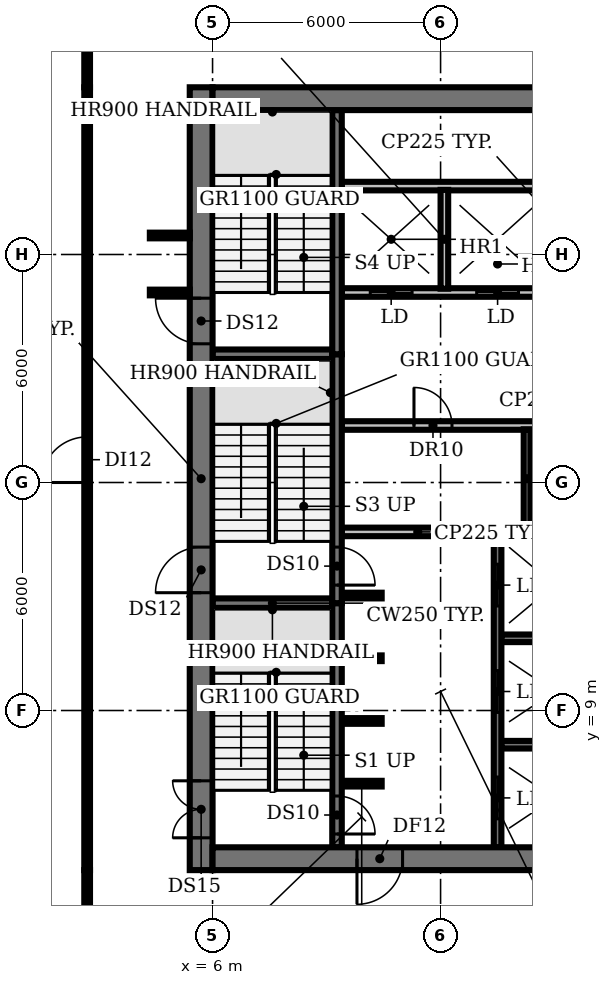
"""IFC4 building model, lengths in metres.
Left out: names, types, materials, properties, quantities, classifications, styles, units other than length and angle.
Written with IfcOpenShell. Run it as: python <this file> out.ifc"""

import sys

from ifc_helpers import new_model, si_unit, direction, frame, frame_2d, origin, place, context, subcontext, project, spatial, rectangle, extrude, element, fill, save


model = new_model("IFC4")
c1 = context("Model", 3, precision=1e-05, world=origin(), true_north=direction((0.0, 1.0)))
c2 = subcontext(c1, "Body", "Model", "MODEL_VIEW")
j1 = project(units=[si_unit("LENGTHUNIT", "METRE"), si_unit("PLANEANGLEUNIT", "RADIAN")], contexts=[c1])
p1 = place(None, origin())
s1 = spatial("IfcSite", under=j1, at=p1, CompositionType="ELEMENT")
p2 = place(p1, origin())
s2 = spatial("IfcBuilding", under=s1, at=p2, CompositionType="ELEMENT")
p3 = place(p2, frame((0.0, 0.0, 180.2)))
s3 = spatial("IfcBuildingStorey", under=s2, at=p3, CompositionType="ELEMENT", Elevation=180.2)
p4 = place(p3, frame((9.4, 7.075, 0.0), z_axis=(0.0, 0.0, 1.0), x_axis=(1.0, 0.0, 0.0)))
e1 = element("IfcWall", 1, at=p4, inside=s3, PredefinedType="SHEAR", context=c2, shape_type="SweptSolid", body=[
    extrude(rectangle(XDim=1.05, YDim=0.15, at=frame_2d((0.525, 0.0))), origin(), (0.0, 0.0, 1.0), 3.85),
])
p5 = place(p3, frame((13.6, 8.1, 0.0), z_axis=(0.0, 0.0, 1.0), x_axis=(1.0, 0.0, 0.0)))
e2 = element("IfcWall", 2, at=p5, inside=s3, PredefinedType="SHEAR", context=c2, shape_type="SweptSolid", body=[
    extrude(rectangle(XDim=2.8, YDim=0.2, at=frame_2d((1.4, 0.0))), origin(), (0.0, 0.0, 1.0), 3.85),
])
for number, where, z_axis, x_axis in (
    (3, (9.4, 8.725, 0.0), (0.0, 0.0, 1.0), (1.0, 0.0, 0.0)),
    (4, (9.4, 10.375, 0.0), (0.0, 0.0, 1.0), (1.0, 0.0, 0.0)),
):
    element("IfcWall", number, at=place(p3, frame(where, z_axis=z_axis, x_axis=x_axis)), inside=s3, PredefinedType="SHEAR", context=c2, shape_type="SweptSolid", body=[
        extrude(rectangle(XDim=1.05, YDim=0.15, at=frame_2d((0.525, 0.0))), origin(), (0.0, 0.0, 1.0), 3.85),
    ])
p6 = place(p3, frame((13.6, 10.9, 0.0), z_axis=(0.0, 0.0, 1.0), x_axis=(1.0, 0.0, 0.0)))
e5 = element("IfcWall", 5, at=p6, inside=s3, PredefinedType="SHEAR", context=c2, shape_type="SweptSolid", body=[
    extrude(rectangle(XDim=2.8, YDim=0.2, at=frame_2d((1.4, 0.0))), origin(), (0.0, 0.0, 1.0), 3.85),
])
p7 = place(p3, frame((6.0, 11.825, 0.0), z_axis=(0.0, 0.0, 1.0), x_axis=(1.0, 0.0, 0.0)))
e6 = element("IfcWall", 6, at=p7, inside=s3, PredefinedType="SHEAR", context=c2, shape_type="SweptSolid", body=[
    extrude(rectangle(XDim=3.15, YDim=0.25, at=frame_2d((1.575, 0.0))), origin(), (0.0, 0.0, 1.0), 3.85),
])
p8 = place(p3, frame((9.4, 12.025, 0.0), z_axis=(0.0, 0.0, 1.0), x_axis=(1.0, 0.0, 0.0)))
e7 = element("IfcWall", 7, at=p8, inside=s3, PredefinedType="SHEAR", context=c2, shape_type="SweptSolid", body=[
    extrude(rectangle(XDim=1.05, YDim=0.15, at=frame_2d((0.525, 0.0))), origin(), (0.0, 0.0, 1.0), 3.85),
])
p9 = place(p3, frame((9.4, 13.7, 0.0), z_axis=(0.0, 0.0, 1.0), x_axis=(1.0, 0.0, 0.0)))
e8 = element("IfcWall", 8, at=p9, inside=s3, PredefinedType="PARTITIONING", context=c2, shape_type="SweptSolid", body=[
    extrude(rectangle(XDim=4.0, YDim=0.225, at=frame_2d((2.0, 0.0))), origin(), (0.0, 0.0, 1.0), 3.85),
])
p10 = place(p3, frame((13.6, 13.7, 0.0), z_axis=(0.0, 0.0, 1.0), x_axis=(1.0, 0.0, 0.0)))
e9 = element("IfcWall", 9, at=p10, inside=s3, PredefinedType="SHEAR", context=c2, shape_type="SweptSolid", body=[
    extrude(rectangle(XDim=2.8, YDim=0.2, at=frame_2d((1.4, 0.0))), origin(), (0.0, 0.0, 1.0), 3.85),
])
p11 = place(p3, frame((9.4, 16.5, 0.0), z_axis=(0.0, 0.0, 1.0), x_axis=(1.0, 0.0, 0.0)))
e10 = element("IfcWall", 10, at=p11, inside=s3, PredefinedType="PARTITIONING", context=c2, shape_type="SweptSolid", body=[
    extrude(rectangle(XDim=14.6, YDim=0.225, at=frame_2d((7.3, 0.0))), origin(), (0.0, 0.0, 1.0), 3.85),
])
p12 = place(p11, frame((1.9, 0.0, 0.0)))
e11 = element("IfcOpeningElement", 11, at=p12, cuts=e10, PredefinedType="OPENING", context=c2, shape_type="SweptSolid", body=[
    extrude(rectangle(XDim=1.0, YDim=2.1, at=frame_2d((0.5, 1.05))), frame((0.0, 0.123, 0.0), z_axis=(0.0, -1.0, 0.0), x_axis=(1.0, 0.0, 0.0)), (0.0, 0.0, 1.0), 0.245),
])
p13 = place(p11, frame((7.475, 0.0, 0.0)))
e12 = element("IfcOpeningElement", 12, at=p13, cuts=e10, PredefinedType="OPENING", context=c2, shape_type="SweptSolid", body=[
    extrude(rectangle(XDim=1.0, YDim=2.1, at=frame_2d((0.5, 1.05))), frame((0.0, 0.123, 0.0), z_axis=(0.0, -1.0, 0.0), x_axis=(1.0, 0.0, 0.0)), (0.0, 0.0, 1.0), 0.245),
])
p14 = place(p11, frame((11.308, 0.0, 0.0)))
e13 = element("IfcOpeningElement", 13, at=p14, cuts=e10, PredefinedType="OPENING", context=c2, shape_type="SweptSolid", body=[
    extrude(rectangle(XDim=0.9, YDim=2.1, at=frame_2d((0.45, 1.05))), frame((0.0, 0.123, 0.0), z_axis=(0.0, -1.0, 0.0), x_axis=(1.0, 0.0, 0.0)), (0.0, 0.0, 1.0), 0.245),
])
p15 = place(p11, frame((13.083, 0.0, 0.0)))
e14 = element("IfcOpeningElement", 14, at=p15, cuts=e10, PredefinedType="OPENING", context=c2, shape_type="SweptSolid", body=[
    extrude(rectangle(XDim=0.9, YDim=2.1, at=frame_2d((0.45, 1.05))), frame((0.0, 0.123, 0.0), z_axis=(0.0, -1.0, 0.0), x_axis=(1.0, 0.0, 0.0)), (0.0, 0.0, 1.0), 0.245),
])
p16 = place(p3, frame((6.0, 18.375, 0.0), z_axis=(0.0, 0.0, 1.0), x_axis=(1.0, 0.0, 0.0)))
e15 = element("IfcWall", 15, at=p16, inside=s3, PredefinedType="SHEAR", context=c2, shape_type="SweptSolid", body=[
    extrude(rectangle(XDim=3.15, YDim=0.25, at=frame_2d((1.575, 0.0))), origin(), (0.0, 0.0, 1.0), 3.85),
])
p17 = place(p3, frame((24.0, 20.0, 0.0), z_axis=(0.0, 0.0, 1.0), x_axis=(-1.0, 0.0, 0.0)))
e16 = element("IfcWall", 16, at=p17, inside=s3, PredefinedType="PARTITIONING", context=c2, shape_type="SweptSolid", body=[
    extrude(rectangle(XDim=14.6, YDim=0.225, at=frame_2d((7.3, 0.0))), origin(), (0.0, 0.0, 1.0), 3.85),
])
p18 = place(p17, frame((12.75, 0.0, 0.0)))
e17 = element("IfcOpeningElement", 17, at=p18, cuts=e16, PredefinedType="OPENING", context=c2, shape_type="SweptSolid", body=[
    extrude(rectangle(XDim=1.1, YDim=2.1, at=frame_2d((0.55, 1.05))), frame((0.0, 0.123, 0.0), z_axis=(0.0, -1.0, 0.0), x_axis=(1.0, 0.0, 0.0)), (0.0, 0.0, 1.0), 0.245),
])
p19 = place(p17, frame((9.95, 0.0, 0.0)))
e18 = element("IfcOpeningElement", 18, at=p19, cuts=e16, PredefinedType="OPENING", context=c2, shape_type="SweptSolid", body=[
    extrude(rectangle(XDim=1.1, YDim=2.1, at=frame_2d((0.55, 1.05))), frame((0.0, 0.123, 0.0), z_axis=(0.0, -1.0, 0.0), x_axis=(1.0, 0.0, 0.0)), (0.0, 0.0, 1.0), 0.245),
])
p20 = place(p17, frame((7.15, 0.0, 0.0)))
e19 = element("IfcOpeningElement", 19, at=p20, cuts=e16, PredefinedType="OPENING", context=c2, shape_type="SweptSolid", body=[
    extrude(rectangle(XDim=1.1, YDim=2.1, at=frame_2d((0.55, 1.05))), frame((0.0, 0.123, 0.0), z_axis=(0.0, -1.0, 0.0), x_axis=(1.0, 0.0, 0.0)), (0.0, 0.0, 1.0), 0.245),
])
p21 = place(p17, frame((4.35, 0.0, 0.0)))
e20 = element("IfcOpeningElement", 20, at=p21, cuts=e16, PredefinedType="OPENING", context=c2, shape_type="SweptSolid", body=[
    extrude(rectangle(XDim=1.1, YDim=2.1, at=frame_2d((0.55, 1.05))), frame((0.0, 0.123, 0.0), z_axis=(0.0, -1.0, 0.0), x_axis=(1.0, 0.0, 0.0)), (0.0, 0.0, 1.0), 0.245),
])
p22 = place(p17, frame((2.308, 0.0, 0.0)))
e21 = element("IfcOpeningElement", 21, at=p22, cuts=e16, PredefinedType="OPENING", context=c2, shape_type="SweptSolid", body=[
    extrude(rectangle(XDim=0.9, YDim=2.1, at=frame_2d((0.45, 1.05))), frame((0.0, 0.123, 0.0), z_axis=(0.0, -1.0, 0.0), x_axis=(1.0, 0.0, 0.0)), (0.0, 0.0, 1.0), 0.245),
])
p23 = place(p17, frame((0.532, 0.0, 0.0)))
e22 = element("IfcOpeningElement", 22, at=p23, cuts=e16, PredefinedType="OPENING", context=c2, shape_type="SweptSolid", body=[
    extrude(rectangle(XDim=0.9, YDim=2.1, at=frame_2d((0.45, 1.05))), frame((0.0, 0.123, 0.0), z_axis=(0.0, -1.0, 0.0), x_axis=(1.0, 0.0, 0.0)), (0.0, 0.0, 1.0), 0.245),
])
p24 = place(p3, frame((9.4, 22.8, 0.0), z_axis=(0.0, 0.0, 1.0), x_axis=(1.0, 0.0, 0.0)))
e23 = element("IfcWall", 23, at=p24, inside=s3, PredefinedType="PARTITIONING", context=c2, shape_type="SweptSolid", body=[
    extrude(rectangle(XDim=14.6, YDim=0.225, at=frame_2d((7.3, 0.0))), origin(), (0.0, 0.0, 1.0), 3.85),
])
p25 = place(p3, frame((9.275, 11.825, 0.0), z_axis=(0.0, 0.0, 1.0), x_axis=(0.0, -1.0, 0.0)))
e24 = element("IfcWall", 24, at=p25, inside=s3, PredefinedType="SHEAR", context=c2, shape_type="SweptSolid", body=[
    extrude(rectangle(XDim=6.425, YDim=0.25, at=frame_2d((3.212, 0.0))), origin(), (0.0, 0.0, 1.0), 3.85),
])
p26 = place(p25, frame((5.075, 0.0, 0.0)))
e25 = element("IfcOpeningElement", 25, at=p26, cuts=e24, PredefinedType="OPENING", context=c2, shape_type="SweptSolid", body=[
    extrude(rectangle(XDim=1.0, YDim=2.1, at=frame_2d((0.5, 1.05))), frame((0.0, 0.135, 0.0), z_axis=(0.0, -1.0, 0.0), x_axis=(1.0, 0.0, 0.0)), (0.0, 0.0, 1.0), 0.27),
])
p27 = place(p3, frame((9.275, 18.375, 0.0), z_axis=(0.0, 0.0, 1.0), x_axis=(0.0, -1.0, 0.0)))
e26 = element("IfcWall", 26, at=p27, inside=s3, PredefinedType="SHEAR", context=c2, shape_type="SweptSolid", body=[
    extrude(rectangle(XDim=6.55, YDim=0.25, at=frame_2d((3.275, 0.0))), origin(), (0.0, 0.0, 1.0), 3.85),
])
p28 = place(p27, frame((5.075, 0.0, 0.0)))
e27 = element("IfcOpeningElement", 27, at=p28, cuts=e26, PredefinedType="OPENING", context=c2, shape_type="SweptSolid", body=[
    extrude(rectangle(XDim=1.0, YDim=2.1, at=frame_2d((0.5, 1.05))), frame((0.0, 0.135, 0.0), z_axis=(0.0, -1.0, 0.0), x_axis=(1.0, 0.0, 0.0)), (0.0, 0.0, 1.0), 0.27),
])
p29 = place(p3, frame((9.275, 18.375, 0.0), z_axis=(0.0, 0.0, 1.0), x_axis=(0.0, 1.0, 0.0)))
e28 = element("IfcWall", 28, at=p29, inside=s3, PredefinedType="SHEAR", context=c2, shape_type="SweptSolid", body=[
    extrude(rectangle(XDim=6.425, YDim=0.25, at=frame_2d((3.212, 0.0))), origin(), (0.0, 0.0, 1.0), 3.85),
])
p30 = place(p3, frame((12.1, 20.1, 0.0), z_axis=(0.0, 0.0, 1.0), x_axis=(0.0, 1.0, 0.0)))
e29 = element("IfcWall", 29, at=p30, inside=s3, PredefinedType="SOLIDWALL", context=c2, shape_type="SweptSolid", body=[
    extrude(rectangle(XDim=2.6, YDim=0.2, at=frame_2d((1.3, 0.0))), origin(), (0.0, 0.0, 1.0), 3.85),
])
p31 = place(p3, frame((13.5, 5.4, 0.0), z_axis=(0.0, 0.0, 1.0), x_axis=(0.0, 1.0, 0.0)))
e30 = element("IfcWall", 30, at=p31, inside=s3, PredefinedType="SHEAR", context=c2, shape_type="SweptSolid", body=[
    extrude(rectangle(XDim=8.2, YDim=0.2, at=frame_2d((4.1, 0.0))), origin(), (0.0, 0.0, 1.0), 3.85),
])
p32 = place(p31, frame((0.75, 0.0, 0.0)))
e31 = element("IfcOpeningElement", 31, at=p32, cuts=e30, PredefinedType="OPENING", context=c2, shape_type="SweptSolid", body=[
    extrude(rectangle(XDim=1.1, YDim=2.1, at=frame_2d((0.55, 1.05))), frame((0.0, 0.11, 0.0), z_axis=(0.0, -1.0, 0.0), x_axis=(1.0, 0.0, 0.0)), (0.0, 0.0, 1.0), 0.22),
])
p33 = place(p31, frame((3.55, 0.0, 0.0)))
e32 = element("IfcOpeningElement", 32, at=p33, cuts=e30, PredefinedType="OPENING", context=c2, shape_type="SweptSolid", body=[
    extrude(rectangle(XDim=1.1, YDim=2.1, at=frame_2d((0.55, 1.05))), frame((0.0, 0.11, 0.0), z_axis=(0.0, -1.0, 0.0), x_axis=(1.0, 0.0, 0.0)), (0.0, 0.0, 1.0), 0.22),
])
p34 = place(p31, frame((6.35, 0.0, 0.0)))
e33 = element("IfcOpeningElement", 33, at=p34, cuts=e30, PredefinedType="OPENING", context=c2, shape_type="SweptSolid", body=[
    extrude(rectangle(XDim=1.1, YDim=2.1, at=frame_2d((0.55, 1.05))), frame((0.0, 0.11, 0.0), z_axis=(0.0, -1.0, 0.0), x_axis=(1.0, 0.0, 0.0)), (0.0, 0.0, 1.0), 0.22),
])
p35 = place(p3, frame((14.275, 13.8, 0.0), z_axis=(0.0, 0.0, 1.0), x_axis=(0.0, 1.0, 0.0)))
e34 = element("IfcWall", 34, at=p35, inside=s3, PredefinedType="PARTITIONING", context=c2, shape_type="SweptSolid", body=[
    extrude(rectangle(XDim=2.6, YDim=0.175, at=frame_2d((1.3, 0.0))), origin(), (0.0, 0.0, 1.0), 3.85),
])
p36 = place(p3, frame((5.7, 4.8, 0.0), z_axis=(0.0, 0.0, 1.0), x_axis=(0.0, 1.0, 0.0)))
e35 = element("IfcWall", 35, at=p36, inside=s3, PredefinedType="SHEAR", context=c2, shape_type="SweptSolid", body=[
    extrude(rectangle(XDim=20.6, YDim=0.6, at=frame_2d((10.3, 0.0))), origin(), (0.0, 0.0, 1.0), 3.85),
])
p37 = place(p36, frame((0.85, 0.0, 0.0)))
e36 = element("IfcOpeningElement", 36, at=p37, cuts=e35, PredefinedType="OPENING", context=c2, shape_type="SweptSolid", body=[
    extrude(rectangle(XDim=1.5, YDim=2.1, at=frame_2d((0.75, 1.05))), frame((0.0, 0.31, 0.0), z_axis=(0.0, -1.0, 0.0), x_axis=(1.0, 0.0, 0.0)), (0.0, 0.0, 1.0), 0.62),
])
p38 = place(p36, frame((7.3, 0.0, 0.0)))
e37 = element("IfcOpeningElement", 37, at=p38, cuts=e35, PredefinedType="OPENING", context=c2, shape_type="SweptSolid", body=[
    extrude(rectangle(XDim=1.2, YDim=2.1, at=frame_2d((0.6, 1.05))), frame((0.0, 0.31, 0.0), z_axis=(0.0, -1.0, 0.0), x_axis=(1.0, 0.0, 0.0)), (0.0, 0.0, 1.0), 0.62),
])
p39 = place(p36, frame((13.85, 0.0, 0.0)))
e38 = element("IfcOpeningElement", 38, at=p39, cuts=e35, PredefinedType="OPENING", context=c2, shape_type="SweptSolid", body=[
    extrude(rectangle(XDim=1.2, YDim=2.1, at=frame_2d((0.6, 1.05))), frame((0.0, 0.31, 0.0), z_axis=(0.0, -1.0, 0.0), x_axis=(1.0, 0.0, 0.0)), (0.0, 0.0, 1.0), 0.62),
])
p40 = place(p3, frame((24.0, 5.1, 0.0), z_axis=(0.0, 0.0, 1.0), x_axis=(-1.0, 0.0, 0.0)))
e39 = element("IfcWall", 39, at=p40, inside=s3, PredefinedType="SHEAR", context=c2, shape_type="SweptSolid", body=[
    extrude(rectangle(XDim=18.0, YDim=0.6, at=frame_2d((9.0, 0.0))), origin(), (0.0, 0.0, 1.0), 3.85),
])
p41 = place(p40, frame((13.0, 0.0, 0.0)))
e40 = element("IfcOpeningElement", 40, at=p41, cuts=e39, PredefinedType="OPENING", context=c2, shape_type="SweptSolid", body=[
    extrude(rectangle(XDim=1.2, YDim=2.1, at=frame_2d((0.6, 1.05))), frame((0.0, 0.31, 0.0), z_axis=(0.0, -1.0, 0.0), x_axis=(1.0, 0.0, 0.0)), (0.0, 0.0, 1.0), 0.62),
])
p42 = place(p40, frame((4.9, 0.0, 0.0)))
e41 = element("IfcOpeningElement", 41, at=p42, cuts=e39, PredefinedType="OPENING", context=c2, shape_type="SweptSolid", body=[
    extrude(rectangle(XDim=1.0, YDim=2.1, at=frame_2d((0.5, 1.05))), frame((0.0, 0.31, 0.0), z_axis=(0.0, -1.0, 0.0), x_axis=(1.0, 0.0, 0.0)), (0.0, 0.0, 1.0), 0.62),
])
p43 = place(p3, frame((6.0, 25.1, 0.0), z_axis=(0.0, 0.0, 1.0), x_axis=(1.0, 0.0, 0.0)))
e42 = element("IfcWall", 42, at=p43, inside=s3, PredefinedType="SHEAR", context=c2, shape_type="SweptSolid", body=[
    extrude(rectangle(XDim=18.0, YDim=0.6, at=frame_2d((9.0, 0.0))), origin(), (0.0, 0.0, 1.0), 3.85),
])
p44 = place(p3, frame((2.7, 0.9, 0.0), z_axis=(0.0, 0.0, 1.0), x_axis=(0.0, 1.0, 0.0)))
e43 = element("IfcWall", 43, at=p44, inside=s3, PredefinedType="PARTITIONING", context=c2, shape_type="SweptSolid", body=[
    extrude(rectangle(XDim=3.9, YDim=0.15, at=frame_2d((1.95, 0.0))), origin(), (0.0, 0.0, 1.0), 2.88),
])
p45 = place(p3, frame((2.7, 4.8, 0.0), z_axis=(0.0, 0.0, 1.0), x_axis=(0.0, 1.0, 0.0)))
e44 = element("IfcWall", 44, at=p45, inside=s3, PredefinedType="PARTITIONING", context=c2, shape_type="SweptSolid", body=[
    extrude(rectangle(XDim=20.6, YDim=0.15, at=frame_2d((10.3, 0.0))), origin(), (0.0, 0.0, 1.0), 2.88),
])
p46 = place(p45, frame((10.2, 0.0, 0.0)))
e45 = element("IfcOpeningElement", 45, at=p46, cuts=e44, PredefinedType="OPENING", context=c2, shape_type="SweptSolid", body=[
    extrude(rectangle(XDim=1.2, YDim=2.1, at=frame_2d((0.6, 1.05))), frame((0.0, 0.085, 0.0), z_axis=(0.0, -1.0, 0.0), x_axis=(1.0, 0.0, 0.0)), (0.0, 0.0, 1.0), 0.17),
])
p47 = place(p3, frame((2.7, 25.4, 0.0), z_axis=(0.0, 0.0, 1.0), x_axis=(0.0, 1.0, 0.0)))
e46 = element("IfcWall", 46, at=p47, inside=s3, PredefinedType="PARTITIONING", context=c2, shape_type="SweptSolid", body=[
    extrude(rectangle(XDim=3.9, YDim=0.15, at=frame_2d((1.95, 0.0))), origin(), (0.0, 0.0, 1.0), 2.88),
])
for number, where, z_axis, x_axis in (
    (47, (4.35, 20.0, 0.0), (0.0, 0.0, 1.0), (1.0, 0.0, 0.0)),
    (48, (4.35, 21.5, 0.0), (0.0, 0.0, 1.0), (1.0, 0.0, 0.0)),
):
    element("IfcWall", number, at=place(p3, frame(where, z_axis=z_axis, x_axis=x_axis)), inside=s3, PredefinedType="PARTITIONING", context=c2, shape_type="SweptSolid", body=[
        extrude(rectangle(XDim=1.05, YDim=0.15, at=frame_2d((0.525, 0.0))), origin(), (0.0, 0.0, 1.0), 2.88),
    ])
p48 = place(p12, origin())
e49 = element("IfcDoor", 49, at=p48, inside=s3, OperationType="SINGLE_SWING_LEFT", PredefinedType="DOOR", context=c2, shape_type="SweptSolid", body=[
    extrude(rectangle(XDim=1.0, YDim=2.1, at=frame_2d((0.5, 1.05))), frame((0.0, 0.025, 0.0), z_axis=(0.0, -1.0, 0.0), x_axis=(1.0, 0.0, 0.0)), (0.0, 0.0, 1.0), 0.05),
])
fill(e11, e49)
p49 = place(p18, origin())
e50 = element("IfcDoor", 50, at=p49, inside=s3, OperationType="DOUBLE_DOOR_SLIDING", PredefinedType="DOOR", context=c2, shape_type="SweptSolid", body=[
    extrude(rectangle(XDim=1.1, YDim=2.1, at=frame_2d((0.55, 1.05))), frame((0.0, 0.025, 0.0), z_axis=(0.0, -1.0, 0.0), x_axis=(1.0, 0.0, 0.0)), (0.0, 0.0, 1.0), 0.05),
])
fill(e17, e50)
p50 = place(p19, origin())
e51 = element("IfcDoor", 51, at=p50, inside=s3, OperationType="DOUBLE_DOOR_SLIDING", PredefinedType="DOOR", context=c2, shape_type="SweptSolid", body=[
    extrude(rectangle(XDim=1.1, YDim=2.1, at=frame_2d((0.55, 1.05))), frame((0.0, 0.025, 0.0), z_axis=(0.0, -1.0, 0.0), x_axis=(1.0, 0.0, 0.0)), (0.0, 0.0, 1.0), 0.05),
])
fill(e18, e51)
p51 = place(p26, origin())
e52 = element("IfcDoor", 52, at=p51, inside=s3, OperationType="SINGLE_SWING_RIGHT", PredefinedType="DOOR", context=c2, shape_type="SweptSolid", body=[
    extrude(rectangle(XDim=1.0, YDim=2.1, at=frame_2d((0.5, 1.05))), frame((0.0, 0.025, 0.0), z_axis=(0.0, -1.0, 0.0), x_axis=(1.0, 0.0, 0.0)), (0.0, 0.0, 1.0), 0.05),
])
fill(e25, e52)
p52 = place(p28, origin())
e53 = element("IfcDoor", 53, at=p52, inside=s3, OperationType="SINGLE_SWING_RIGHT", PredefinedType="DOOR", context=c2, shape_type="SweptSolid", body=[
    extrude(rectangle(XDim=1.0, YDim=2.1, at=frame_2d((0.5, 1.05))), frame((0.0, 0.025, 0.0), z_axis=(0.0, -1.0, 0.0), x_axis=(1.0, 0.0, 0.0)), (0.0, 0.0, 1.0), 0.05),
])
fill(e27, e53)
p53 = place(p32, origin())
e54 = element("IfcDoor", 54, at=p53, inside=s3, OperationType="DOUBLE_DOOR_SLIDING", PredefinedType="DOOR", context=c2, shape_type="SweptSolid", body=[
    extrude(rectangle(XDim=1.1, YDim=2.1, at=frame_2d((0.55, 1.05))), frame((0.0, 0.025, 0.0), z_axis=(0.0, -1.0, 0.0), x_axis=(1.0, 0.0, 0.0)), (0.0, 0.0, 1.0), 0.05),
])
fill(e31, e54)
p54 = place(p33, origin())
e55 = element("IfcDoor", 55, at=p54, inside=s3, OperationType="DOUBLE_DOOR_SLIDING", PredefinedType="DOOR", context=c2, shape_type="SweptSolid", body=[
    extrude(rectangle(XDim=1.1, YDim=2.1, at=frame_2d((0.55, 1.05))), frame((0.0, 0.025, 0.0), z_axis=(0.0, -1.0, 0.0), x_axis=(1.0, 0.0, 0.0)), (0.0, 0.0, 1.0), 0.05),
])
fill(e32, e55)
p55 = place(p34, origin())
e56 = element("IfcDoor", 56, at=p55, inside=s3, OperationType="DOUBLE_DOOR_SLIDING", PredefinedType="DOOR", context=c2, shape_type="SweptSolid", body=[
    extrude(rectangle(XDim=1.1, YDim=2.1, at=frame_2d((0.55, 1.05))), frame((0.0, 0.025, 0.0), z_axis=(0.0, -1.0, 0.0), x_axis=(1.0, 0.0, 0.0)), (0.0, 0.0, 1.0), 0.05),
])
fill(e33, e56)
p56 = place(p37, origin())
e57 = element("IfcDoor", 57, at=p56, inside=s3, OperationType="DOUBLE_DOOR_SINGLE_SWING", PredefinedType="DOOR", context=c2, shape_type="SweptSolid", body=[
    extrude(rectangle(XDim=1.5, YDim=2.1, at=frame_2d((0.75, 1.05))), frame((0.0, 0.025, 0.0), z_axis=(0.0, -1.0, 0.0), x_axis=(1.0, 0.0, 0.0)), (0.0, 0.0, 1.0), 0.05),
])
fill(e36, e57)
p57 = place(p38, origin())
e58 = element("IfcDoor", 58, at=p57, inside=s3, OperationType="SINGLE_SWING_LEFT", PredefinedType="DOOR", context=c2, shape_type="SweptSolid", body=[
    extrude(rectangle(XDim=1.2, YDim=2.1, at=frame_2d((0.6, 1.05))), frame((0.0, 0.025, 0.0), z_axis=(0.0, -1.0, 0.0), x_axis=(1.0, 0.0, 0.0)), (0.0, 0.0, 1.0), 0.05),
])
fill(e37, e58)
p58 = place(p39, origin())
e59 = element("IfcDoor", 59, at=p58, inside=s3, OperationType="SINGLE_SWING_RIGHT", PredefinedType="DOOR", context=c2, shape_type="SweptSolid", body=[
    extrude(rectangle(XDim=1.2, YDim=2.1, at=frame_2d((0.6, 1.05))), frame((0.0, 0.025, 0.0), z_axis=(0.0, -1.0, 0.0), x_axis=(1.0, 0.0, 0.0)), (0.0, 0.0, 1.0), 0.05),
])
fill(e38, e59)
p59 = place(p41, origin())
e60 = element("IfcDoor", 60, at=p59, inside=s3, OperationType="SINGLE_SWING_RIGHT", PredefinedType="DOOR", context=c2, shape_type="SweptSolid", body=[
    extrude(rectangle(XDim=1.2, YDim=2.1, at=frame_2d((0.6, 1.05))), frame((0.0, 0.025, 0.0), z_axis=(0.0, -1.0, 0.0), x_axis=(1.0, 0.0, 0.0)), (0.0, 0.0, 1.0), 0.05),
])
fill(e40, e60)
p60 = place(p46, origin())
e61 = element("IfcDoor", 61, at=p60, inside=s3, OperationType="SINGLE_SWING_LEFT", PredefinedType="DOOR", context=c2, shape_type="SweptSolid", body=[
    extrude(rectangle(XDim=1.2, YDim=2.1, at=frame_2d((0.6, 1.05))), frame((0.0, 0.025, 0.0), z_axis=(0.0, -1.0, 0.0), x_axis=(1.0, 0.0, 0.0)), (0.0, 0.0, 1.0), 0.05),
])
fill(e45, e61)
save(model, sys.argv[1])
